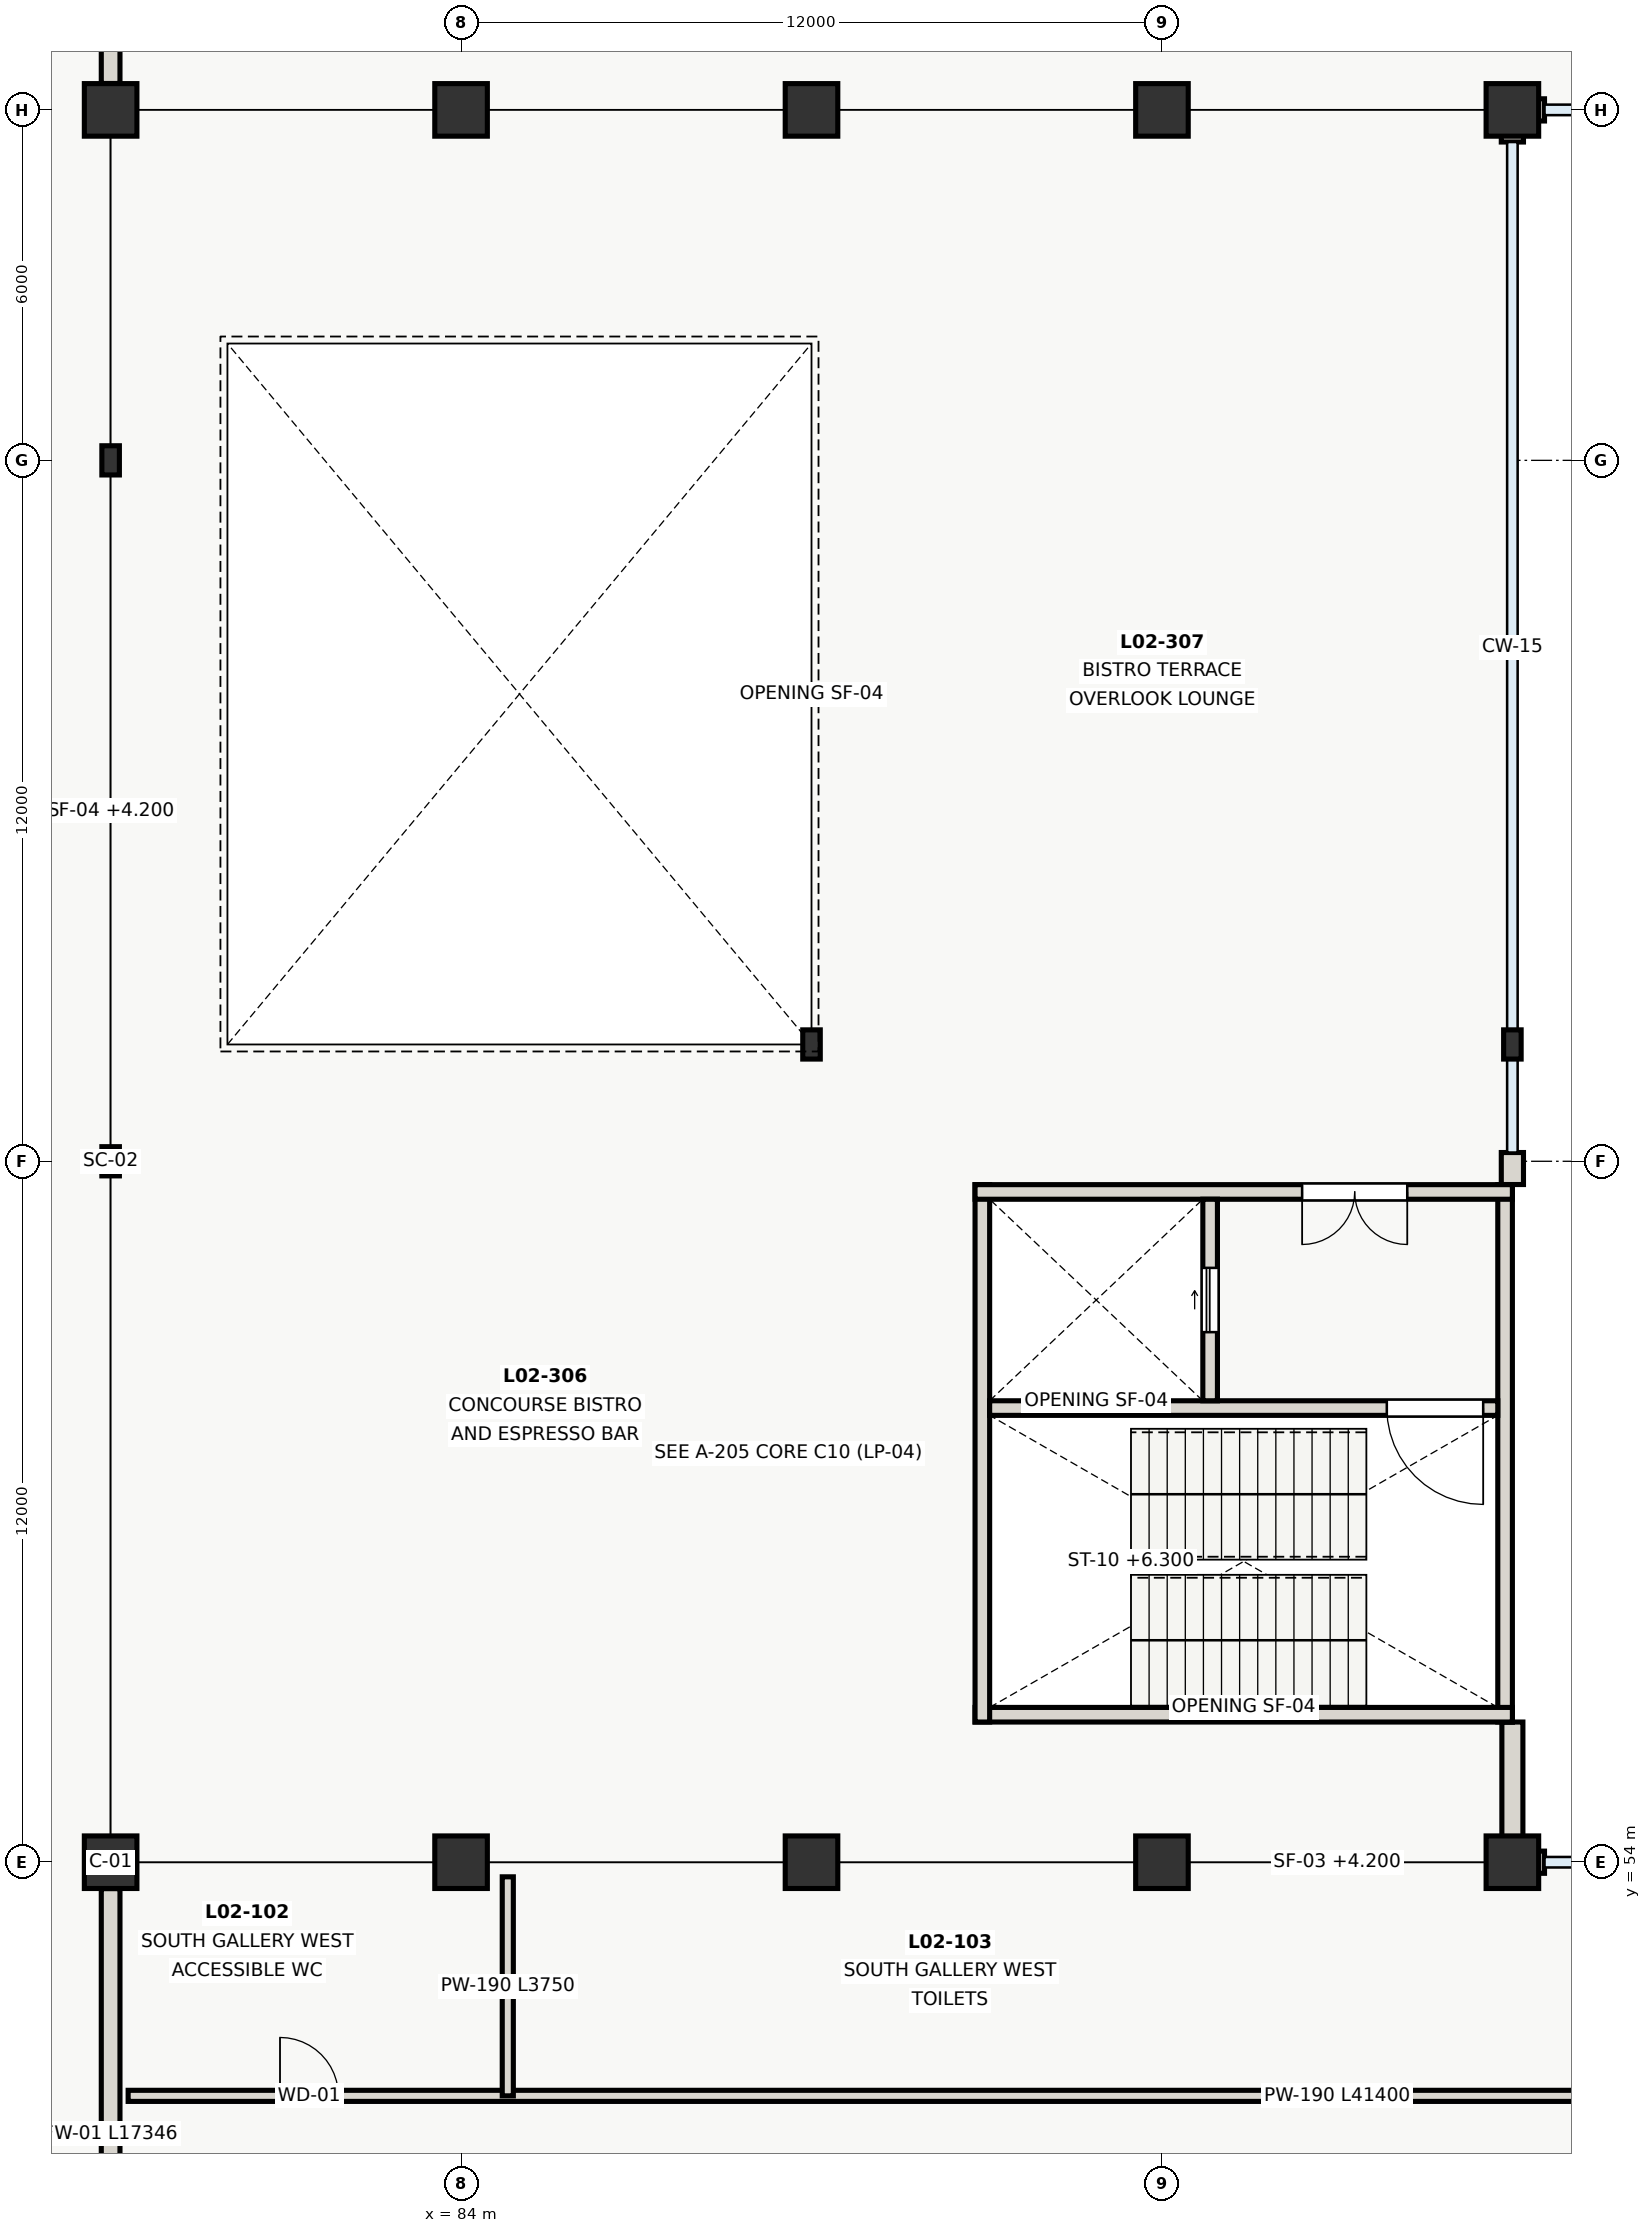
"""IFC4 building model, lengths in metres.
Left out: names, types, materials, properties, quantities, classifications, styles, units other than length and angle.
Written with IfcOpenShell. Run it as: python <this file> out.ifc"""

import sys

from ifc_helpers import new_model, si_unit, direction, frame, frame_2d, origin, origin_2d, place, context, subcontext, project, spatial, rectangle, i_section, extrude, element, fill, save


model = new_model("IFC4")
c1 = context("Model", 3, precision=1e-05, world=origin(), true_north=direction((0.0, 1.0)))
c2 = subcontext(c1, "Body", "Model", "MODEL_VIEW")
j1 = project(units=[si_unit("LENGTHUNIT", "METRE"), si_unit("PLANEANGLEUNIT", "RADIAN")], contexts=[c1])
p1 = place(None, origin())
s1 = spatial("IfcSite", under=j1, at=p1, CompositionType="ELEMENT")
p2 = place(p1, origin())
s2 = spatial("IfcBuilding", under=s1, at=p2, CompositionType="ELEMENT")
p3 = place(p2, frame((0.0, 0.0, 4.2)))
s3 = spatial("IfcBuildingStorey", under=s2, at=p3, CompositionType="ELEMENT", Elevation=4.2)
for number, where, z_axis, x_axis in (
    (1, (78.0, 54.0, 0.0), (0.0, 0.0, 1.0), (1.0, 0.0, 0.0)),
    (2, (84.0, 54.0, 0.0), (0.0, 0.0, 1.0), (1.0, 0.0, 0.0)),
    (3, (90.0, 54.0, 0.0), (0.0, 0.0, 1.0), (1.0, 0.0, 0.0)),
    (4, (96.0, 54.0, 0.0), (0.0, 0.0, 1.0), (1.0, 0.0, 0.0)),
    (5, (102.0, 54.0, 0.0), (0.0, 0.0, 1.0), (1.0, 0.0, 0.0)),
):
    element("IfcColumn", number, at=place(p3, frame(where, z_axis=z_axis, x_axis=x_axis)), inside=s3, PredefinedType="COLUMN", context=c2, shape_type="SweptSolid", body=[
        extrude(rectangle(XDim=0.9, YDim=0.9, at=origin_2d()), origin(), (0.0, 0.0, 1.0), 4.2),
    ])
for number, where, z_axis, x_axis in (
    (6, (78.0, 66.0, 0.0), (0.0, 0.0, 1.0), (1.0, 0.0, 0.0)),
    (7, (90.0, 68.0, 0.0), (0.0, 0.0, 1.0), (1.0, 0.0, 0.0)),
    (8, (102.0, 68.0, 0.0), (0.0, 0.0, 1.0), (1.0, 0.0, 0.0)),
    (9, (78.0, 78.0, 0.0), (0.0, 0.0, 1.0), (1.0, 0.0, 0.0)),
):
    element("IfcColumn", number, at=place(p3, frame(where, z_axis=z_axis, x_axis=x_axis)), inside=s3, PredefinedType="COLUMN", context=c2, shape_type="SweptSolid", body=[
        extrude(i_section(OverallWidth=0.3, OverallDepth=0.5, WebThickness=0.014, FlangeThickness=0.028, at=origin_2d()), origin(), (0.0, 0.0, 1.0), 4.2),
    ])
for number, where, z_axis, x_axis in (
    (10, (78.0, 84.0, 0.0), (0.0, 0.0, 1.0), (1.0, 0.0, 0.0)),
    (11, (84.0, 84.0, 0.0), (0.0, 0.0, 1.0), (1.0, 0.0, 0.0)),
    (12, (90.0, 84.0, 0.0), (0.0, 0.0, 1.0), (1.0, 0.0, 0.0)),
    (13, (96.0, 84.0, 0.0), (0.0, 0.0, 1.0), (1.0, 0.0, 0.0)),
    (14, (102.0, 84.0, 0.0), (0.0, 0.0, 1.0), (1.0, 0.0, 0.0)),
):
    element("IfcColumn", number, at=place(p3, frame(where, z_axis=z_axis, x_axis=x_axis)), inside=s3, PredefinedType="COLUMN", context=c2, shape_type="SweptSolid", body=[
        extrude(rectangle(XDim=0.9, YDim=0.9, at=origin_2d()), origin(), (0.0, 0.0, 1.0), 4.2),
    ])
p4 = place(p3, frame((102.182, 54.0, 0.0), z_axis=(0.0, 0.0, 1.0), x_axis=(1.0, 0.0, 0.0)))
e15 = element("IfcWall", 15, at=p4, inside=s3, PredefinedType="SOLIDWALL", context=c2, shape_type="SweptSolid", body=[
    extrude(rectangle(XDim=0.368, YDim=0.38, at=frame_2d((0.184, 0.0))), origin(), (0.0, 0.0, 1.0), 3.56),
])
p5 = place(p3, frame((102.55, 84.0, 0.0), z_axis=(0.0, 0.0, 1.0), x_axis=(-1.0, 0.0, 0.0)))
e16 = element("IfcWall", 16, at=p5, inside=s3, PredefinedType="SOLIDWALL", context=c2, shape_type="SweptSolid", body=[
    extrude(rectangle(XDim=0.55, YDim=0.38, at=frame_2d((0.275, 0.0))), origin(), (0.0, 0.0, 1.0), 3.45),
])
p6 = place(p3, frame((102.0, 56.4, 0.0), z_axis=(0.0, 0.0, 1.0), x_axis=(0.0, -1.0, 0.0)))
e17 = element("IfcWall", 17, at=p6, inside=s3, PredefinedType="SOLIDWALL", context=c2, shape_type="SweptSolid", body=[
    extrude(rectangle(XDim=2.4, YDim=0.36, at=frame_2d((1.2, 0.0))), origin(), (0.0, 0.0, 1.0), 3.5),
])
p7 = place(p3, frame((102.0, 66.15, 0.0), z_axis=(0.0, 0.0, 1.0), x_axis=(0.0, -1.0, 0.0)))
e18 = element("IfcWall", 18, at=p7, inside=s3, PredefinedType="SOLIDWALL", context=c2, shape_type="SweptSolid", body=[
    extrude(rectangle(XDim=0.548, YDim=0.38, at=frame_2d((0.274, 0.0))), origin(), (0.0, 0.0, 1.0), 3.5),
])
p8 = place(p3, frame((102.0, 83.808, 0.0), z_axis=(0.0, 0.0, 1.0), x_axis=(0.0, -1.0, 0.0)))
e19 = element("IfcWall", 19, at=p8, inside=s3, PredefinedType="SOLIDWALL", context=c2, shape_type="SweptSolid", body=[
    extrude(rectangle(XDim=0.358, YDim=0.38, at=frame_2d((0.179, 0.0))), origin(), (0.0, 0.0, 1.0), 3.32),
])
p9 = place(p3, frame((101.875, 65.6, 0.0), z_axis=(0.0, 0.0, 1.0), x_axis=(0.0, -1.0, 0.0)))
e20 = element("IfcWall", 20, at=p9, inside=s3, PredefinedType="SHEAR", context=c2, shape_type="SweptSolid", body=[
    extrude(rectangle(XDim=9.2, YDim=0.25, at=frame_2d((4.6, 0.0))), origin(), (0.0, 0.0, 1.0), 4.2),
])
p10 = place(p3, frame((102.0, 56.525, 0.0), z_axis=(0.0, 0.0, 1.0), x_axis=(-1.0, 0.0, 0.0)))
e21 = element("IfcWall", 21, at=p10, inside=s3, PredefinedType="SHEAR", context=c2, shape_type="SweptSolid", body=[
    extrude(rectangle(XDim=9.2, YDim=0.25, at=frame_2d((4.6, 0.0))), origin(), (0.0, 0.0, 1.0), 4.2),
])
p11 = place(p3, frame((92.925, 56.4, 0.0), z_axis=(0.0, 0.0, 1.0), x_axis=(0.0, 1.0, 0.0)))
e22 = element("IfcWall", 22, at=p11, inside=s3, PredefinedType="SHEAR", context=c2, shape_type="SweptSolid", body=[
    extrude(rectangle(XDim=9.2, YDim=0.25, at=frame_2d((4.6, 0.0))), origin(), (0.0, 0.0, 1.0), 4.2),
])
p12 = place(p3, frame((102.0, 65.475, 0.0), z_axis=(0.0, 0.0, 1.0), x_axis=(-1.0, 0.0, 0.0)))
e23 = element("IfcWall", 23, at=p12, inside=s3, PredefinedType="SHEAR", context=c2, shape_type="SweptSolid", body=[
    extrude(rectangle(XDim=9.2, YDim=0.25, at=frame_2d((4.6, 0.0))), origin(), (0.0, 0.0, 1.0), 4.2),
])
p13 = place(p12, frame((1.8, 0.0, 0.0)))
e24 = element("IfcOpeningElement", 24, at=p13, cuts=e23, PredefinedType="OPENING", context=c2, shape_type="SweptSolid", body=[
    extrude(rectangle(XDim=1.8, YDim=2.15, at=frame_2d((0.9, 1.075))), frame((0.0, 0.135, 0.0), z_axis=(0.0, -1.0, 0.0), x_axis=(1.0, 0.0, 0.0)), (0.0, 0.0, 1.0), 0.27),
])
p14 = place(p3, frame((101.75, 61.775, 0.0), z_axis=(0.0, 0.0, 1.0), x_axis=(-1.0, 0.0, 0.0)))
e25 = element("IfcWall", 25, at=p14, inside=s3, PredefinedType="SHEAR", context=c2, shape_type="SweptSolid", body=[
    extrude(rectangle(XDim=8.7, YDim=0.25, at=frame_2d((4.35, 0.0))), origin(), (0.0, 0.0, 1.0), 4.2),
])
p15 = place(p14, frame((0.25, 0.0, 0.0)))
e26 = element("IfcOpeningElement", 26, at=p15, cuts=e25, PredefinedType="OPENING", context=c2, shape_type="SweptSolid", body=[
    extrude(rectangle(XDim=1.65, YDim=2.1, at=frame_2d((0.825, 1.05))), frame((0.0, 0.135, 0.0), z_axis=(0.0, -1.0, 0.0), x_axis=(1.0, 0.0, 0.0)), (0.0, 0.0, 1.0), 0.27),
])
p16 = place(p3, frame((96.825, 61.9, 0.0), z_axis=(0.0, 0.0, 1.0), x_axis=(0.0, 1.0, 0.0)))
e27 = element("IfcWall", 27, at=p16, inside=s3, PredefinedType="SHEAR", context=c2, shape_type="SweptSolid", body=[
    extrude(rectangle(XDim=3.45, YDim=0.25, at=frame_2d((1.725, 0.0))), origin(), (0.0, 0.0, 1.0), 4.2),
])
p17 = place(p16, frame((1.175, 0.0, 0.0)))
e28 = element("IfcOpeningElement", 28, at=p17, cuts=e27, PredefinedType="OPENING", context=c2, shape_type="SweptSolid", body=[
    extrude(rectangle(XDim=1.1, YDim=2.1, at=frame_2d((0.55, 1.05))), frame((0.0, 0.135, 0.0), z_axis=(0.0, -1.0, 0.0), x_axis=(1.0, 0.0, 0.0)), (0.0, 0.0, 1.0), 0.27),
])
p18 = place(p3, frame((78.0, 36.202, 0.0), z_axis=(0.0, 0.0, 1.0), x_axis=(0.0, 1.0, 0.0)))
e29 = element("IfcWall", 29, at=p18, inside=s3, PredefinedType="SHEAR", context=c2, shape_type="SweptSolid", body=[
    extrude(rectangle(XDim=17.346, YDim=0.32, at=frame_2d((8.673, 0.0))), origin(), (0.0, 0.0, 1.0), 3.8),
])
p19 = place(p18, frame((7.148, 0.0, 0.0)))
e30 = element("IfcOpeningElement", 30, at=p19, cuts=e29, PredefinedType="OPENING", context=c2, shape_type="SweptSolid", body=[
    extrude(rectangle(XDim=2.5, YDim=2.4, at=frame_2d((1.25, 1.2))), frame((0.0, 0.17, 0.0), z_axis=(0.0, -1.0, 0.0), x_axis=(1.0, 0.0, 0.0)), (0.0, 0.0, 1.0), 0.34),
])
p20 = place(p3, frame((78.0, 84.452, 0.0), z_axis=(0.0, 0.0, 1.0), x_axis=(0.0, 1.0, 0.0)))
e31 = element("IfcWall", 31, at=p20, inside=s3, PredefinedType="SHEAR", context=c2, shape_type="SweptSolid", body=[
    extrude(rectangle(XDim=17.346, YDim=0.32, at=frame_2d((8.673, 0.0))), origin(), (0.0, 0.0, 1.0), 3.8),
])
p21 = place(p20, frame((6.898, 0.0, 0.0)))
e32 = element("IfcOpeningElement", 32, at=p21, cuts=e31, PredefinedType="OPENING", context=c2, shape_type="SweptSolid", body=[
    extrude(rectangle(XDim=2.5, YDim=2.4, at=frame_2d((1.25, 1.2))), frame((0.0, 0.17, 0.0), z_axis=(0.0, -1.0, 0.0), x_axis=(1.0, 0.0, 0.0)), (0.0, 0.0, 1.0), 0.34),
])
p22 = place(p3, frame((78.3, 50.0, 0.0), z_axis=(0.0, 0.0, 1.0), x_axis=(1.0, 0.0, 0.0)))
e33 = element("IfcWall", 33, at=p22, inside=s3, PredefinedType="PLUMBINGWALL", context=c2, shape_type="SweptSolid", body=[
    extrude(rectangle(XDim=41.4, YDim=0.19, at=frame_2d((20.7, 0.0))), origin(), (0.0, 0.0, 1.0), 3.72),
])
p23 = place(p22, frame((2.6, 0.0, 0.0)))
e34 = element("IfcOpeningElement", 34, at=p23, cuts=e33, PredefinedType="OPENING", context=c2, shape_type="SweptSolid", body=[
    extrude(rectangle(XDim=1.0, YDim=2.1, at=frame_2d((0.5, 1.05))), frame((0.0, 0.105, 0.0), z_axis=(0.0, -1.0, 0.0), x_axis=(1.0, 0.0, 0.0)), (0.0, 0.0, 1.0), 0.21),
])
p24 = place(p22, frame((26.91, 0.0, 0.0)))
e35 = element("IfcOpeningElement", 35, at=p24, cuts=e33, PredefinedType="OPENING", context=c2, shape_type="SweptSolid", body=[
    extrude(rectangle(XDim=0.9, YDim=2.05, at=frame_2d((0.45, 1.025))), frame((0.0, 0.105, 0.0), z_axis=(0.0, -1.0, 0.0), x_axis=(1.0, 0.0, 0.0)), (0.0, 0.0, 1.0), 0.21),
])
p25 = place(p3, frame((84.8, 50.0, 0.0), z_axis=(0.0, 0.0, 1.0), x_axis=(0.0, 1.0, 0.0)))
e36 = element("IfcWall", 36, at=p25, inside=s3, PredefinedType="PLUMBINGWALL", context=c2, shape_type="SweptSolid", body=[
    extrude(rectangle(XDim=3.75, YDim=0.19, at=frame_2d((1.875, 0.0))), origin(), (0.0, 0.0, 1.0), 3.72),
])
p26 = place(p13, origin())
e37 = element("IfcDoor", 37, at=p26, inside=s3, OperationType="DOUBLE_DOOR_SINGLE_SWING", PredefinedType="DOOR", context=c2, shape_type="SweptSolid", body=[
    extrude(rectangle(XDim=1.8, YDim=2.15, at=frame_2d((0.9, 1.075))), frame((0.0, 0.025, 0.0), z_axis=(0.0, -1.0, 0.0), x_axis=(1.0, 0.0, 0.0)), (0.0, 0.0, 1.0), 0.05),
])
fill(e24, e37)
p27 = place(p15, origin())
e38 = element("IfcDoor", 38, at=p27, inside=s3, OperationType="SINGLE_SWING_LEFT", PredefinedType="DOOR", context=c2, shape_type="SweptSolid", body=[
    extrude(rectangle(XDim=1.65, YDim=2.1, at=frame_2d((0.825, 1.05))), frame((0.0, 0.025, 0.0), z_axis=(0.0, -1.0, 0.0), x_axis=(1.0, 0.0, 0.0)), (0.0, 0.0, 1.0), 0.05),
])
fill(e26, e38)
p28 = place(p17, origin())
e39 = element("IfcDoor", 39, at=p28, inside=s3, OperationType="SLIDING_TO_RIGHT", PredefinedType="DOOR", context=c2, shape_type="SweptSolid", body=[
    extrude(rectangle(XDim=1.1, YDim=2.1, at=frame_2d((0.55, 1.05))), frame((0.0, 0.025, 0.0), z_axis=(0.0, -1.0, 0.0), x_axis=(1.0, 0.0, 0.0)), (0.0, 0.0, 1.0), 0.05),
])
fill(e28, e39)
p29 = place(p23, origin())
e40 = element("IfcDoor", 40, at=p29, inside=s3, OperationType="SINGLE_SWING_LEFT", PredefinedType="DOOR", context=c2, shape_type="SweptSolid", body=[
    extrude(rectangle(XDim=1.0, YDim=2.1, at=frame_2d((0.5, 1.05))), frame((0.0, 0.025, 0.0), z_axis=(0.0, -1.0, 0.0), x_axis=(1.0, 0.0, 0.0)), (0.0, 0.0, 1.0), 0.05),
])
fill(e34, e40)
save(model, sys.argv[1])
